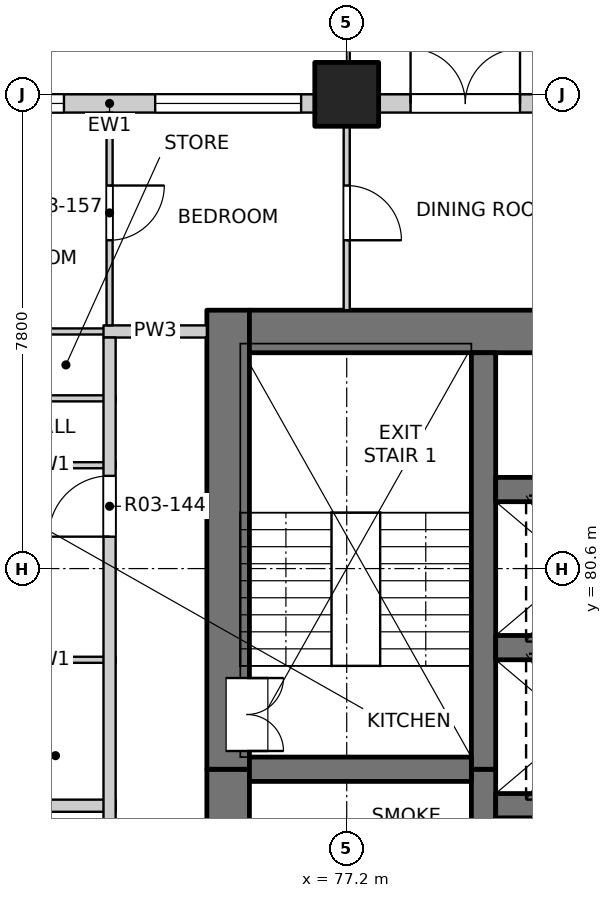
"""IFC4 building model, lengths in metres.
Left out: names, types, materials, properties, quantities, classifications, styles, units other than length and angle.
Written with IfcOpenShell. Run it as: python <this file> out.ifc"""

import sys

from ifc_helpers import new_model, si_unit, direction, frame, frame_2d, origin, origin_2d, place, context, subcontext, project, spatial, rectangle, extrude, element, fill, save


model = new_model("IFC4")
c1 = context("Model", 3, precision=1e-05, world=origin(), true_north=direction((0.0, 1.0)))
c2 = subcontext(c1, "Body", "Model", "MODEL_VIEW")
j1 = project(units=[si_unit("LENGTHUNIT", "METRE"), si_unit("PLANEANGLEUNIT", "RADIAN")], contexts=[c1])
p1 = place(None, origin())
s1 = spatial("IfcSite", under=j1, at=p1, CompositionType="ELEMENT")
p2 = place(p1, origin())
s2 = spatial("IfcBuilding", under=s1, at=p2, CompositionType="ELEMENT")
p3 = place(p2, frame((0.0, 0.0, 43.3)))
s3 = spatial("IfcBuildingStorey", under=s2, at=p3, CompositionType="ELEMENT", Elevation=43.3)
p4 = place(p3, frame((77.2, 88.4, -0.25), z_axis=(0.0, 0.0, 1.0), x_axis=(1.0, 0.0, 0.0)))
e1 = element("IfcColumn", 1, at=p4, inside=s3, PredefinedType="COLUMN", context=c2, shape_type="SweptSolid", body=[
    extrude(rectangle(XDim=1.05, YDim=1.05, at=origin_2d()), origin(), (0.0, 0.0, 1.0), 3.35),
])
p5 = place(p3, frame((75.25, 54.9, -0.25), z_axis=(0.0, 0.0, 1.0), x_axis=(0.0, 1.0, 0.0)))
e2 = element("IfcWall", 2, at=p5, inside=s3, PredefinedType="SOLIDWALL", context=c2, shape_type="SweptSolid", body=[
    extrude(rectangle(XDim=22.4, YDim=0.7, at=frame_2d((11.2, 0.0))), origin(), (0.0, 0.0, 1.0), 3.35),
])
p6 = place(p5, frame((7.55, 0.0, 0.25)))
e3 = element("IfcOpeningElement", 3, at=p6, cuts=e2, PredefinedType="OPENING", context=c2, shape_type="SweptSolid", body=[
    extrude(rectangle(XDim=0.9, YDim=2.1, at=frame_2d((0.45, 1.05))), frame((0.0, 0.36, 0.0), z_axis=(0.0, -1.0, 0.0), x_axis=(1.0, 0.0, 0.0)), (0.0, 0.0, 1.0), 0.72),
])
p7 = place(p5, frame((12.2, 0.0, 0.25)))
e4 = element("IfcOpeningElement", 4, at=p7, cuts=e2, PredefinedType="OPENING", context=c2, shape_type="SweptSolid", body=[
    extrude(rectangle(XDim=0.9, YDim=2.1, at=frame_2d((0.45, 1.05))), frame((0.0, 0.36, 0.0), z_axis=(0.0, -1.0, 0.0), x_axis=(1.0, 0.0, 0.0)), (0.0, 0.0, 1.0), 0.72),
])
p8 = place(p5, frame((16.7, 0.0, 0.25)))
e5 = element("IfcOpeningElement", 5, at=p8, cuts=e2, PredefinedType="OPENING", context=c2, shape_type="SweptSolid", body=[
    extrude(rectangle(XDim=0.9, YDim=2.1, at=frame_2d((0.45, 1.05))), frame((0.0, 0.36, 0.0), z_axis=(0.0, -1.0, 0.0), x_axis=(1.0, 0.0, 0.0)), (0.0, 0.0, 1.0), 0.72),
])
p9 = place(p5, frame((20.15, 0.0, 0.25)))
e6 = element("IfcOpeningElement", 6, at=p9, cuts=e2, PredefinedType="OPENING", context=c2, shape_type="SweptSolid", body=[
    extrude(rectangle(XDim=0.9, YDim=2.1, at=frame_2d((0.45, 1.05))), frame((0.0, 0.36, 0.0), z_axis=(0.0, -1.0, 0.0), x_axis=(1.0, 0.0, 0.0)), (0.0, 0.0, 1.0), 0.72),
])
p10 = place(p3, frame((75.25, 77.3, -0.25), z_axis=(0.0, 0.0, 1.0), x_axis=(0.0, 1.0, 0.0)))
e7 = element("IfcWall", 7, at=p10, inside=s3, PredefinedType="SOLIDWALL", context=c2, shape_type="SweptSolid", body=[
    extrude(rectangle(XDim=7.55, YDim=0.7, at=frame_2d((3.775, 0.0))), origin(), (0.0, 0.0, 1.0), 3.35),
])
p11 = place(p10, frame((0.3, 0.0, 0.25)))
e8 = element("IfcOpeningElement", 8, at=p11, cuts=e7, PredefinedType="OPENING", context=c2, shape_type="SweptSolid", body=[
    extrude(rectangle(XDim=1.2, YDim=2.1, at=frame_2d((0.6, 1.05))), frame((0.0, 0.36, 0.0), z_axis=(0.0, -1.0, 0.0), x_axis=(1.0, 0.0, 0.0)), (0.0, 0.0, 1.0), 0.72),
])
p12 = place(p3, frame((75.6, 84.5, -0.25), z_axis=(0.0, 0.0, 1.0), x_axis=(1.0, 0.0, 0.0)))
e9 = element("IfcWall", 9, at=p12, inside=s3, PredefinedType="SOLIDWALL", context=c2, shape_type="SweptSolid", body=[
    extrude(rectangle(XDim=18.8, YDim=0.7, at=frame_2d((9.4, 0.0))), origin(), (0.0, 0.0, 1.0), 3.35),
])
p13 = place(p3, frame((79.45, 60.9, -0.25), z_axis=(0.0, 0.0, 1.0), x_axis=(0.0, 1.0, 0.0)))
e10 = element("IfcWall", 10, at=p13, inside=s3, PredefinedType="SOLIDWALL", context=c2, shape_type="SweptSolid", body=[
    extrude(rectangle(XDim=16.4, YDim=0.4, at=frame_2d((8.2, 0.0))), origin(), (0.0, 0.0, 1.0), 3.35),
])
p14 = place(p3, frame((79.45, 77.3, -0.25), z_axis=(0.0, 0.0, 1.0), x_axis=(0.0, 1.0, 0.0)))
e11 = element("IfcWall", 11, at=p14, inside=s3, PredefinedType="SOLIDWALL", context=c2, shape_type="SweptSolid", body=[
    extrude(rectangle(XDim=6.85, YDim=0.4, at=frame_2d((3.425, 0.0))), origin(), (0.0, 0.0, 1.0), 3.35),
])
for number, where, z_axis, x_axis in (
    (12, (79.65, 76.7, -0.25), (0.0, 0.0, 1.0), (1.0, 0.0, 0.0)),
    (13, (79.65, 79.3, -0.25), (0.0, 0.0, 1.0), (1.0, 0.0, 0.0)),
    (14, (79.65, 81.9, -0.25), (0.0, 0.0, 1.0), (1.0, 0.0, 0.0)),
):
    element("IfcWall", number, at=place(p3, frame(where, z_axis=z_axis, x_axis=x_axis)), inside=s3, PredefinedType="SOLIDWALL", context=c2, shape_type="SweptSolid", body=[
        extrude(rectangle(XDim=3.0, YDim=0.4, at=frame_2d((1.5, 0.0))), origin(), (0.0, 0.0, 1.0), 3.35),
    ])
p15 = place(p3, frame((75.6, 77.3, -0.25), z_axis=(0.0, 0.0, 1.0), x_axis=(1.0, 0.0, 0.0)))
e15 = element("IfcWall", 15, at=p15, inside=s3, PredefinedType="SOLIDWALL", context=c2, shape_type="SweptSolid", body=[
    extrude(rectangle(XDim=3.65, YDim=0.4, at=frame_2d((1.825, 0.0))), origin(), (0.0, 0.0, 1.0), 3.35),
])
p16 = place(p3, frame((69.925, 88.25, 0.0), z_axis=(0.0, 0.0, 1.0), x_axis=(1.0, 0.0, 0.0)))
e16 = element("IfcWall", 16, at=p16, inside=s3, PredefinedType="SOLIDWALL", context=c2, shape_type="SweptSolid", body=[
    extrude(rectangle(XDim=6.75, YDim=0.3, at=frame_2d((3.375, 0.0))), origin(), (0.0, 0.0, 1.0), 3.1),
])
p17 = place(p16, frame((0.225, 0.0, 0.9)))
e17 = element("IfcOpeningElement", 17, at=p17, cuts=e16, PredefinedType="OPENING", context=c2, shape_type="SweptSolid", body=[
    extrude(rectangle(XDim=2.4, YDim=1.8, at=frame_2d((1.2, 0.9))), frame((0.0, 0.16, 0.0), z_axis=(0.0, -1.0, 0.0), x_axis=(1.0, 0.0, 0.0)), (0.0, 0.0, 1.0), 0.32),
])
p18 = place(p16, frame((4.125, 0.0, 0.9)))
e18 = element("IfcOpeningElement", 18, at=p18, cuts=e16, PredefinedType="OPENING", context=c2, shape_type="SweptSolid", body=[
    extrude(rectangle(XDim=2.4, YDim=1.8, at=frame_2d((1.2, 0.9))), frame((0.0, 0.16, 0.0), z_axis=(0.0, -1.0, 0.0), x_axis=(1.0, 0.0, 0.0)), (0.0, 0.0, 1.0), 0.32),
])
p19 = place(p3, frame((77.725, 88.25, 0.0), z_axis=(0.0, 0.0, 1.0), x_axis=(1.0, 0.0, 0.0)))
e19 = element("IfcWall", 19, at=p19, inside=s3, PredefinedType="SOLIDWALL", context=c2, shape_type="SweptSolid", body=[
    extrude(rectangle(XDim=6.75, YDim=0.3, at=frame_2d((3.375, 0.0))), origin(), (0.0, 0.0, 1.0), 3.1),
])
p20 = place(p19, frame((0.525, 0.0, 0.0)))
e20 = element("IfcOpeningElement", 20, at=p20, cuts=e19, PredefinedType="OPENING", context=c2, shape_type="SweptSolid", body=[
    extrude(rectangle(XDim=1.8, YDim=2.4, at=frame_2d((0.9, 1.2))), frame((0.0, 0.16, 0.0), z_axis=(0.0, -1.0, 0.0), x_axis=(1.0, 0.0, 0.0)), (0.0, 0.0, 1.0), 0.32),
])
p21 = place(p19, frame((4.125, 0.0, 0.9)))
e21 = element("IfcOpeningElement", 21, at=p21, cuts=e19, PredefinedType="OPENING", context=c2, shape_type="SweptSolid", body=[
    extrude(rectangle(XDim=2.4, YDim=1.8, at=frame_2d((1.2, 0.9))), frame((0.0, 0.16, 0.0), z_axis=(0.0, -1.0, 0.0), x_axis=(1.0, 0.0, 0.0)), (0.0, 0.0, 1.0), 0.32),
])
p22 = place(p3, frame((61.9, 76.7, 0.0), z_axis=(0.0, 0.0, 1.0), x_axis=(1.0, 0.0, 0.0)))
e22 = element("IfcWall", 22, at=p22, inside=s3, PredefinedType="PARTITIONING", context=c2, shape_type="SweptSolid", body=[
    extrude(rectangle(XDim=11.5, YDim=0.2, at=frame_2d((5.75, 0.0))), origin(), (0.0, 0.0, 1.0), 3.1),
])
for number, where, z_axis, x_axis in (
    (23, (71.18, 79.1, 0.0), (0.0, 0.0, 1.0), (1.0, 0.0, 0.0)),
    (24, (71.18, 82.3, 0.0), (0.0, 0.0, 1.0), (1.0, 0.0, 0.0)),
    (25, (71.18, 83.4, 0.0), (0.0, 0.0, 1.0), (1.0, 0.0, 0.0)),
):
    element("IfcWall", number, at=place(p3, frame(where, z_axis=z_axis, x_axis=x_axis)), inside=s3, PredefinedType="PARTITIONING", context=c2, shape_type="SweptSolid", body=[
        extrude(rectangle(XDim=2.22, YDim=0.1, at=frame_2d((1.11, 0.0))), origin(), (0.0, 0.0, 1.0), 3.1),
    ])
p23 = place(p3, frame((61.9, 84.5, 0.0), z_axis=(0.0, 0.0, 1.0), x_axis=(1.0, 0.0, 0.0)))
e26 = element("IfcWall", 26, at=p23, inside=s3, PredefinedType="PARTITIONING", context=c2, shape_type="SweptSolid", body=[
    extrude(rectangle(XDim=11.5, YDim=0.1, at=frame_2d((5.75, 0.0))), origin(), (0.0, 0.0, 1.0), 3.1),
])
p24 = place(p23, frame((7.965, 0.0, 0.0)))
e27 = element("IfcOpeningElement", 27, at=p24, cuts=e26, PredefinedType="OPENING", context=c2, shape_type="SweptSolid", body=[
    extrude(rectangle(XDim=0.9, YDim=2.1, at=frame_2d((0.45, 1.05))), frame((0.0, 0.06, 0.0), z_axis=(0.0, -1.0, 0.0), x_axis=(1.0, 0.0, 0.0)), (0.0, 0.0, 1.0), 0.12),
])
p25 = place(p3, frame((73.2, 84.5, 0.0), z_axis=(0.0, 0.0, 1.0), x_axis=(1.0, 0.0, 0.0)))
e28 = element("IfcWall", 28, at=p25, inside=s3, PredefinedType="PARTITIONING", context=c2, shape_type="SweptSolid", body=[
    extrude(rectangle(XDim=1.7, YDim=0.2, at=frame_2d((0.85, 0.0))), origin(), (0.0, 0.0, 1.0), 3.1),
])
p26 = place(p3, frame((73.3, 53.4, 0.0), z_axis=(0.0, 0.0, 1.0), x_axis=(0.0, 1.0, 0.0)))
e29 = element("IfcWall", 29, at=p26, inside=s3, PredefinedType="PARTITIONING", context=c2, shape_type="SweptSolid", body=[
    extrude(rectangle(XDim=31.0, YDim=0.2, at=frame_2d((15.5, 0.0))), origin(), (0.0, 0.0, 1.0), 3.1),
])
p27 = place(p26, frame((5.775, 0.0, 0.0)))
e30 = element("IfcOpeningElement", 30, at=p27, cuts=e29, PredefinedType="OPENING", context=c2, shape_type="SweptSolid", body=[
    extrude(rectangle(XDim=1.0, YDim=2.1, at=frame_2d((0.5, 1.05))), frame((0.0, 0.11, 0.0), z_axis=(0.0, -1.0, 0.0), x_axis=(1.0, 0.0, 0.0)), (0.0, 0.0, 1.0), 0.22),
])
p28 = place(p26, frame((10.875, 0.0, 0.0)))
e31 = element("IfcOpeningElement", 31, at=p28, cuts=e29, PredefinedType="OPENING", context=c2, shape_type="SweptSolid", body=[
    extrude(rectangle(XDim=1.0, YDim=2.1, at=frame_2d((0.5, 1.05))), frame((0.0, 0.11, 0.0), z_axis=(0.0, -1.0, 0.0), x_axis=(1.0, 0.0, 0.0)), (0.0, 0.0, 1.0), 0.22),
])
p29 = place(p26, frame((18.025, 0.0, 0.0)))
e32 = element("IfcOpeningElement", 32, at=p29, cuts=e29, PredefinedType="OPENING", context=c2, shape_type="SweptSolid", body=[
    extrude(rectangle(XDim=1.0, YDim=2.1, at=frame_2d((0.5, 1.05))), frame((0.0, 0.11, 0.0), z_axis=(0.0, -1.0, 0.0), x_axis=(1.0, 0.0, 0.0)), (0.0, 0.0, 1.0), 0.22),
])
p30 = place(p26, frame((27.725, 0.0, 0.0)))
e33 = element("IfcOpeningElement", 33, at=p30, cuts=e29, PredefinedType="OPENING", context=c2, shape_type="SweptSolid", body=[
    extrude(rectangle(XDim=1.0, YDim=2.1, at=frame_2d((0.5, 1.05))), frame((0.0, 0.11, 0.0), z_axis=(0.0, -1.0, 0.0), x_axis=(1.0, 0.0, 0.0)), (0.0, 0.0, 1.0), 0.22),
])
p31 = place(p3, frame((73.3, 84.6, 0.0), z_axis=(0.0, 0.0, 1.0), x_axis=(0.0, 1.0, 0.0)))
e34 = element("IfcWall", 34, at=p31, inside=s3, PredefinedType="PARTITIONING", context=c2, shape_type="SweptSolid", body=[
    extrude(rectangle(XDim=3.5, YDim=0.1, at=frame_2d((1.75, 0.0))), origin(), (0.0, 0.0, 1.0), 3.1),
])
p32 = place(p31, frame((1.4, 0.0, 0.0)))
e35 = element("IfcOpeningElement", 35, at=p32, cuts=e34, PredefinedType="OPENING", context=c2, shape_type="SweptSolid", body=[
    extrude(rectangle(XDim=0.9, YDim=2.1, at=frame_2d((0.45, 1.05))), frame((0.0, 0.06, 0.0), z_axis=(0.0, -1.0, 0.0), x_axis=(1.0, 0.0, 0.0)), (0.0, 0.0, 1.0), 0.12),
])
p33 = place(p3, frame((77.2, 84.85, 0.0), z_axis=(0.0, 0.0, 1.0), x_axis=(0.0, 1.0, 0.0)))
e36 = element("IfcWall", 36, at=p33, inside=s3, PredefinedType="PARTITIONING", context=c2, shape_type="SweptSolid", body=[
    extrude(rectangle(XDim=3.25, YDim=0.1, at=frame_2d((1.625, 0.0))), origin(), (0.0, 0.0, 1.0), 3.1),
])
p34 = place(p33, frame((1.15, 0.0, 0.0)))
e37 = element("IfcOpeningElement", 37, at=p34, cuts=e36, PredefinedType="OPENING", context=c2, shape_type="SweptSolid", body=[
    extrude(rectangle(XDim=0.9, YDim=2.1, at=frame_2d((0.45, 1.05))), frame((0.0, 0.06, 0.0), z_axis=(0.0, -1.0, 0.0), x_axis=(1.0, 0.0, 0.0)), (0.0, 0.0, 1.0), 0.12),
])
p35 = place(p17, origin())
e38 = element("IfcWindow", 38, at=p35, inside=s3, PartitioningType="DOUBLE_PANEL_VERTICAL", PredefinedType="WINDOW", context=c2, shape_type="SweptSolid", body=[
    extrude(rectangle(XDim=2.4, YDim=1.8, at=frame_2d((1.2, 0.9))), frame((0.0, 0.03, 0.0), z_axis=(0.0, -1.0, 0.0), x_axis=(1.0, 0.0, 0.0)), (0.0, 0.0, 1.0), 0.06),
])
fill(e17, e38)
p36 = place(p18, origin())
e39 = element("IfcWindow", 39, at=p36, inside=s3, PartitioningType="DOUBLE_PANEL_VERTICAL", PredefinedType="WINDOW", context=c2, shape_type="SweptSolid", body=[
    extrude(rectangle(XDim=2.4, YDim=1.8, at=frame_2d((1.2, 0.9))), frame((0.0, 0.03, 0.0), z_axis=(0.0, -1.0, 0.0), x_axis=(1.0, 0.0, 0.0)), (0.0, 0.0, 1.0), 0.06),
])
fill(e18, e39)
p37 = place(p20, origin())
e40 = element("IfcDoor", 40, at=p37, inside=s3, OperationType="DOUBLE_DOOR_SINGLE_SWING", PredefinedType="DOOR", context=c2, shape_type="SweptSolid", body=[
    extrude(rectangle(XDim=1.8, YDim=2.4, at=frame_2d((0.9, 1.2))), frame((0.0, 0.025, 0.0), z_axis=(0.0, -1.0, 0.0), x_axis=(1.0, 0.0, 0.0)), (0.0, 0.0, 1.0), 0.05),
])
fill(e20, e40)
p38 = place(p11, origin())
e41 = element("IfcDoor", 41, at=p38, inside=s3, OperationType="DOUBLE_DOOR_SINGLE_SWING", PredefinedType="DOOR", context=c2, shape_type="SweptSolid", body=[
    extrude(rectangle(XDim=1.2, YDim=2.1, at=frame_2d((0.6, 1.05))), frame((0.0, -0.285, 0.0), z_axis=(0.0, -1.0, 0.0), x_axis=(1.0, 0.0, 0.0)), (0.0, 0.0, 1.0), 0.05),
])
fill(e8, e41)
p39 = place(p30, origin())
e42 = element("IfcDoor", 42, at=p39, inside=s3, OperationType="SINGLE_SWING_LEFT", PredefinedType="DOOR", context=c2, shape_type="SweptSolid", body=[
    extrude(rectangle(XDim=1.0, YDim=2.1, at=frame_2d((0.5, 1.05))), frame((0.0, 0.025, 0.0), z_axis=(0.0, -1.0, 0.0), x_axis=(1.0, 0.0, 0.0)), (0.0, 0.0, 1.0), 0.05),
])
fill(e33, e42)
p40 = place(p32, origin())
e43 = element("IfcDoor", 43, at=p40, inside=s3, OperationType="SINGLE_SWING_LEFT", PredefinedType="DOOR", context=c2, shape_type="SweptSolid", body=[
    extrude(rectangle(XDim=0.9, YDim=2.1, at=frame_2d((0.45, 1.05))), frame((0.0, 0.025, 0.0), z_axis=(0.0, -1.0, 0.0), x_axis=(1.0, 0.0, 0.0)), (0.0, 0.0, 1.0), 0.05),
])
fill(e35, e43)
p41 = place(p34, origin())
e44 = element("IfcDoor", 44, at=p41, inside=s3, OperationType="SINGLE_SWING_RIGHT", PredefinedType="DOOR", context=c2, shape_type="SweptSolid", body=[
    extrude(rectangle(XDim=0.9, YDim=2.1, at=frame_2d((0.45, 1.05))), frame((0.0, 0.025, 0.0), z_axis=(0.0, -1.0, 0.0), x_axis=(1.0, 0.0, 0.0)), (0.0, 0.0, 1.0), 0.05),
])
fill(e37, e44)
save(model, sys.argv[1])
